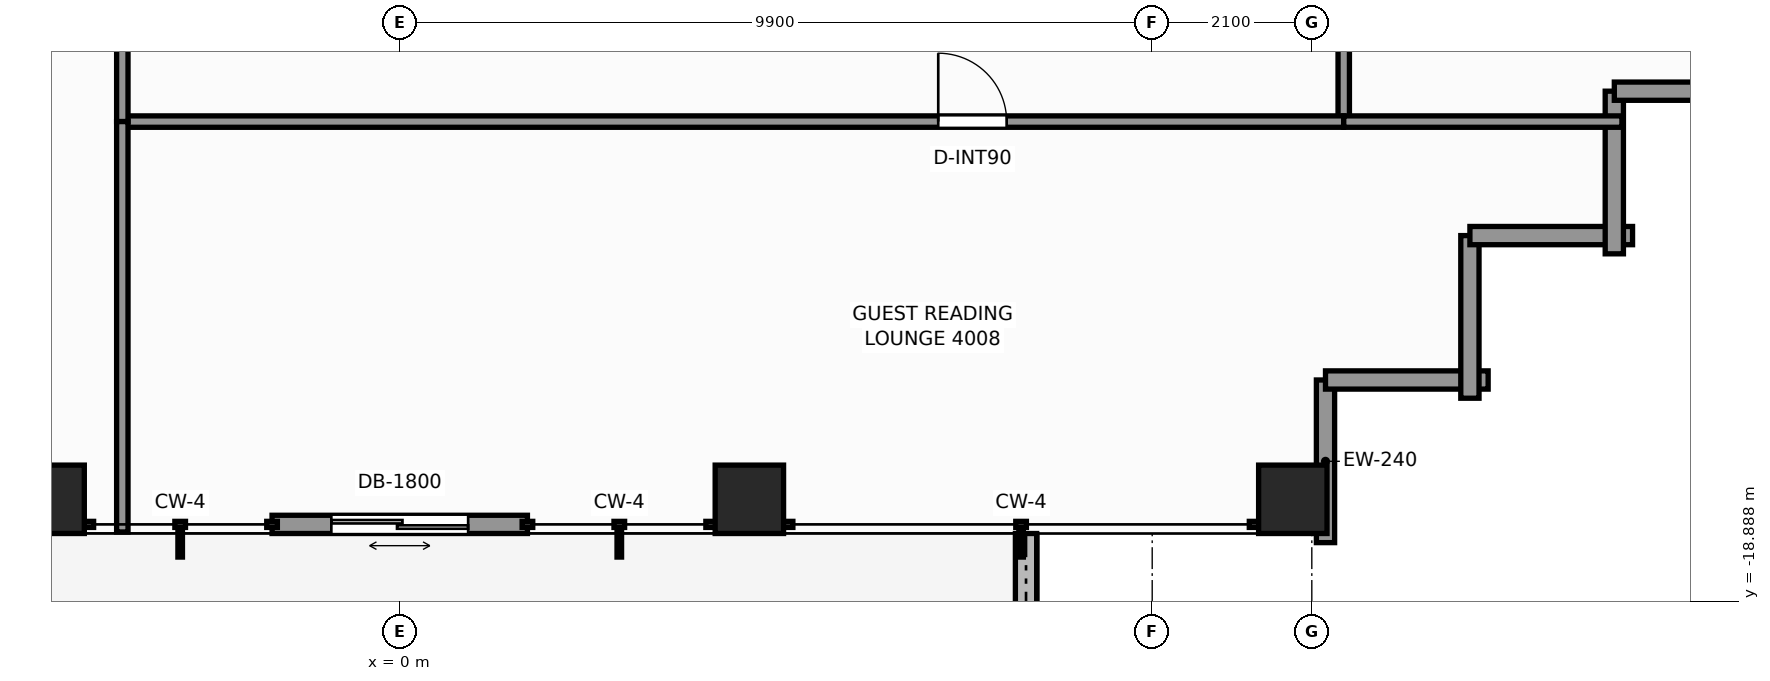
"""IFC4 building model, lengths in metres.
Left out: names, types, materials, properties, quantities, classifications, styles, units other than length and angle.
Written with IfcOpenShell. Run it as: python <this file> out.ifc"""

import sys

from ifc_helpers import new_model, si_unit, direction, frame, frame_2d, origin, origin_2d, place, context, subcontext, project, spatial, rectangle, extrude, element, fill, save


model = new_model("IFC4")
c1 = context("Model", 3, precision=1e-05, world=origin(), true_north=direction((0.0, 1.0)))
c2 = subcontext(c1, "Body", "Model", "MODEL_VIEW")
j1 = project(units=[si_unit("LENGTHUNIT", "METRE"), si_unit("PLANEANGLEUNIT", "RADIAN")], contexts=[c1])
p1 = place(None, origin())
s1 = spatial("IfcSite", under=j1, at=p1, CompositionType="ELEMENT")
p2 = place(p1, origin())
s2 = spatial("IfcBuilding", under=s1, at=p2, CompositionType="ELEMENT")
p3 = place(p2, frame((0.0, 0.0, 138.2)))
s3 = spatial("IfcBuildingStorey", under=s2, at=p3, CompositionType="ELEMENT", Elevation=138.2)
for number, where, z_axis, x_axis in (
    (1, (-4.6, -17.55, 0.0), (0.0, 0.0, 1.0), (1.0, 0.0, 0.0)),
    (2, (4.6, -17.55, 0.0), (0.0, 0.0, 1.0), (1.0, 0.0, 0.0)),
    (3, (11.75, -17.55, 0.0), (0.0, 0.0, 1.0), (1.0, 0.0, 0.0)),
):
    element("IfcColumn", number, at=place(p3, frame(where, z_axis=z_axis, x_axis=x_axis)), inside=s3, PredefinedType="COLUMN", context=c2, shape_type="SweptSolid", body=[
        extrude(rectangle(XDim=0.9, YDim=0.9, at=origin_2d()), origin(), (0.0, 0.0, 1.0), 3.3),
    ])
p4 = place(p3, frame((8.24, -19.466, -0.02), z_axis=(0.0, 0.0, 1.0), x_axis=(0.0, 1.0, 0.0)))
e4 = element("IfcWall", 4, at=p4, inside=s3, PredefinedType="PARAPET", context=c2, shape_type="SweptSolid", body=[
    extrude(rectangle(XDim=1.466, YDim=0.28, at=frame_2d((0.733, 0.0))), origin(), (0.0, 0.0, 1.0), 0.42),
])
p5 = place(p3, frame((1.68, -17.88, 0.0), z_axis=(0.0, 0.0, 1.0), x_axis=(-1.0, 0.0, 0.0)))
e5 = element("IfcWall", 5, at=p5, inside=s3, PredefinedType="STANDARD", context=c2, shape_type="SweptSolid", body=[
    extrude(rectangle(XDim=3.36, YDim=0.24, at=frame_2d((1.68, 0.0))), origin(), (0.0, 0.0, 1.0), 3.1),
])
p6 = place(p5, frame((0.78, 0.0, 0.0)))
e6 = element("IfcOpeningElement", 6, at=p6, cuts=e5, PredefinedType="OPENING", context=c2, shape_type="SweptSolid", body=[
    extrude(rectangle(XDim=1.8, YDim=2.2, at=frame_2d((0.9, 1.1))), frame((0.0, 0.13, 0.0), z_axis=(0.0, -1.0, 0.0), x_axis=(1.0, 0.0, 0.0)), (0.0, 0.0, 1.0), 0.26),
])
for number, where, z_axis, x_axis in (
    (7, (12.18, -15.98, 0.0), (0.0, 0.0, 1.0), (0.0, -1.0, 0.0)),
    (8, (14.32, -15.98, 0.0), (0.0, 0.0, 1.0), (-1.0, 0.0, 0.0)),
):
    element("IfcWall", number, at=place(p3, frame(where, z_axis=z_axis, x_axis=x_axis)), inside=s3, PredefinedType="STANDARD", context=c2, shape_type="SweptSolid", body=[
        extrude(rectangle(XDim=2.14, YDim=0.24, at=frame_2d((1.07, 0.0))), origin(), (0.0, 0.0, 1.0), 2.479),
    ])
for number, where, z_axis, x_axis in (
    (9, (14.08, -14.08, 0.0), (0.0, 0.0, 1.0), (0.0, -1.0, 0.0)),
    (10, (16.22, -14.08, 0.0), (0.0, 0.0, 1.0), (-1.0, 0.0, 0.0)),
):
    element("IfcWall", number, at=place(p3, frame(where, z_axis=z_axis, x_axis=x_axis)), inside=s3, PredefinedType="STANDARD", context=c2, shape_type="SweptSolid", body=[
        extrude(rectangle(XDim=2.14, YDim=0.24, at=frame_2d((1.07, 0.0))), origin(), (0.0, 0.0, 1.0), 2.479),
    ])
for number, where, z_axis, x_axis in (
    (11, (15.98, -12.18, 0.0), (0.0, 0.0, 1.0), (0.0, -1.0, 0.0)),
    (12, (18.12, -12.18, 0.0), (0.0, 0.0, 1.0), (-1.0, 0.0, 0.0)),
):
    element("IfcWall", number, at=place(p3, frame(where, z_axis=z_axis, x_axis=x_axis)), inside=s3, PredefinedType="STANDARD", context=c2, shape_type="SweptSolid", body=[
        extrude(rectangle(XDim=2.14, YDim=0.24, at=frame_2d((1.07, 0.0))), origin(), (0.0, 0.0, 1.0), 2.479),
    ])
p7 = place(p3, frame((12.42, -12.58, 0.0), z_axis=(0.0, 0.0, 1.0), x_axis=(0.0, 1.0, 0.0)))
e13 = element("IfcWall", 13, at=p7, inside=s3, PredefinedType="PARTITIONING", context=c2, shape_type="SweptSolid", body=[
    extrude(rectangle(XDim=24.84, YDim=0.15, at=frame_2d((12.42, 0.0))), origin(), (0.0, 0.0, 1.0), 2.312),
])
p8 = place(p7, frame((4.595, 0.0, 0.0)))
e14 = element("IfcOpeningElement", 14, at=p8, cuts=e13, PredefinedType="OPENING", context=c2, shape_type="SweptSolid", body=[
    extrude(rectangle(XDim=0.9, YDim=2.06, at=frame_2d((0.45, 1.03))), frame((0.0, 0.085, 0.0), z_axis=(0.0, -1.0, 0.0), x_axis=(1.0, 0.0, 0.0)), (0.0, 0.0, 1.0), 0.17),
])
p9 = place(p7, frame((19.665, 0.0, 0.0)))
e15 = element("IfcOpeningElement", 15, at=p9, cuts=e13, PredefinedType="OPENING", context=c2, shape_type="SweptSolid", body=[
    extrude(rectangle(XDim=0.9, YDim=2.06, at=frame_2d((0.45, 1.03))), frame((0.0, 0.085, 0.0), z_axis=(0.0, -1.0, 0.0), x_axis=(1.0, 0.0, 0.0)), (0.0, 0.0, 1.0), 0.17),
])
p10 = place(p3, frame((-3.65, -12.58, 0.0), z_axis=(0.0, 0.0, 1.0), x_axis=(1.0, 0.0, 0.0)))
e16 = element("IfcWall", 16, at=p10, inside=s3, PredefinedType="PARTITIONING", context=c2, shape_type="SweptSolid", body=[
    extrude(rectangle(XDim=16.07, YDim=0.15, at=frame_2d((8.035, 0.0))), origin(), (0.0, 0.0, 1.0), 2.312),
])
p11 = place(p10, frame((10.735, 0.0, 0.0)))
e17 = element("IfcOpeningElement", 17, at=p11, cuts=e16, PredefinedType="OPENING", context=c2, shape_type="SweptSolid", body=[
    extrude(rectangle(XDim=0.9, YDim=2.06, at=frame_2d((0.45, 1.03))), frame((0.0, 0.085, 0.0), z_axis=(0.0, -1.0, 0.0), x_axis=(1.0, 0.0, 0.0)), (0.0, 0.0, 1.0), 0.17),
])
p12 = place(p3, frame((-3.65, -12.58, 0.0), z_axis=(0.0, 0.0, 1.0), x_axis=(0.0, 1.0, 0.0)))
e18 = element("IfcWall", 18, at=p12, inside=s3, PredefinedType="PARTITIONING", context=c2, shape_type="SweptSolid", body=[
    extrude(rectangle(XDim=2.68, YDim=0.15, at=frame_2d((1.34, 0.0))), origin(), (0.0, 0.0, 1.0), 3.1),
])
p13 = place(p3, frame((12.42, -12.58, 0.0), z_axis=(0.0, 0.0, 1.0), x_axis=(1.0, 0.0, 0.0)))
e19 = element("IfcWall", 19, at=p13, inside=s3, PredefinedType="PARTITIONING", context=c2, shape_type="SweptSolid", body=[
    extrude(rectangle(XDim=3.66, YDim=0.15, at=frame_2d((1.83, 0.0))), origin(), (0.0, 0.0, 1.0), 3.1),
])
p14 = place(p3, frame((-3.65, -17.98, 0.0), z_axis=(0.0, 0.0, 1.0), x_axis=(0.0, 1.0, 0.0)))
e20 = element("IfcWall", 20, at=p14, inside=s3, PredefinedType="PARTITIONING", context=c2, shape_type="SweptSolid", body=[
    extrude(rectangle(XDim=5.4, YDim=0.15, at=frame_2d((2.7, 0.0))), origin(), (0.0, 0.0, 1.0), 2.469),
])
p15 = place(p6, origin())
e21 = element("IfcDoor", 21, at=p15, inside=s3, OperationType="DOUBLE_DOOR_SLIDING", PredefinedType="DOOR", context=c2, shape_type="SweptSolid", body=[
    extrude(rectangle(XDim=1.8, YDim=2.2, at=frame_2d((0.9, 1.1))), frame((0.0, 0.025, 0.0), z_axis=(0.0, -1.0, 0.0), x_axis=(1.0, 0.0, 0.0)), (0.0, 0.0, 1.0), 0.05),
])
fill(e6, e21)
p16 = place(p11, origin())
e22 = element("IfcDoor", 22, at=p16, inside=s3, OperationType="SINGLE_SWING_LEFT", PredefinedType="DOOR", context=c2, shape_type="SweptSolid", body=[
    extrude(rectangle(XDim=0.9, YDim=2.06, at=frame_2d((0.45, 1.03))), frame((0.0, 0.025, 0.0), z_axis=(0.0, -1.0, 0.0), x_axis=(1.0, 0.0, 0.0)), (0.0, 0.0, 1.0), 0.05),
])
fill(e17, e22)
save(model, sys.argv[1])
